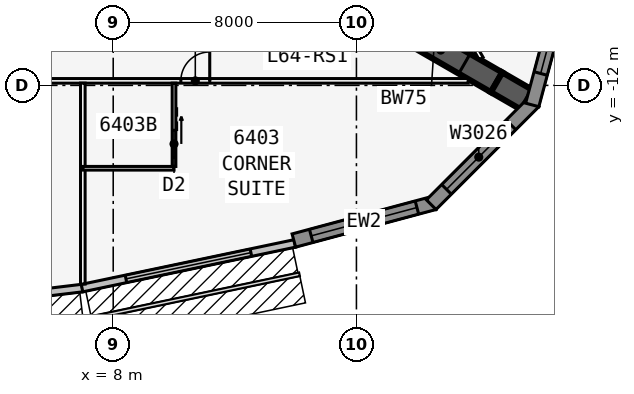
"""IFC4 building model, lengths in metres.
Left out: names, types, materials, properties, quantities, classifications, styles, units other than length and angle.
Written with IfcOpenShell. Run it as: python <this file> out.ifc"""

import sys

from ifc_helpers import new_model, si_unit, direction, frame, frame_2d, origin, place, context, subcontext, project, spatial, polyline, rectangle, outline, extrude, element, fill, save


model = new_model("IFC4")
c1 = context("Model", 3, precision=1e-05, world=origin(), true_north=direction((0.0, 1.0)))
c2 = subcontext(c1, "Body", "Model", "MODEL_VIEW")
j1 = project(units=[si_unit("LENGTHUNIT", "METRE"), si_unit("PLANEANGLEUNIT", "RADIAN")], contexts=[c1])
p1 = place(None, origin())
s1 = spatial("IfcSite", under=j1, at=p1, CompositionType="ELEMENT")
p2 = place(p1, origin())
s2 = spatial("IfcBuilding", under=s1, at=p2, CompositionType="ELEMENT")
p3 = place(p2, frame((0.0, 0.0, 242.9)))
s3 = spatial("IfcBuildingStorey", under=s2, at=p3, CompositionType="ELEMENT", Elevation=242.9)
p4 = place(p3, frame((16.5, -9.526, 0.0), z_axis=(0.0, 0.0, 1.0), x_axis=(0.866031398331, -0.499989616998, 0.0)))
e1 = element("IfcWall", 1, at=p4, inside=s3, PredefinedType="SHEAR", context=c2, shape_type="SweptSolid", body=[
    extrude(rectangle(XDim=4.746, YDim=0.75, at=frame_2d((2.373, 0.0))), origin(), (0.0, 0.0, 1.0), 3.6),
])
p5 = place(p4, frame((1.725, 0.0, 0.0)))
e2 = element("IfcOpeningElement", 2, at=p5, cuts=e1, PredefinedType="OPENING", context=c2, shape_type="SweptSolid", body=[
    extrude(rectangle(XDim=1.8, YDim=2.13, at=frame_2d((0.9, 1.065))), frame((0.0, 0.385, 0.0), z_axis=(0.0, -1.0, 0.0), x_axis=(1.0, 0.0, 0.0)), (0.0, 0.0, 1.0), 0.77),
])
p6 = place(p3, frame((20.61, -11.899, 0.0), z_axis=(0.0, 0.0, 1.0), x_axis=(0.866009537788, -0.500027479704, 0.0)))
e3 = element("IfcWall", 3, at=p6, inside=s3, PredefinedType="SHEAR", context=c2, shape_type="SweptSolid", body=[
    extrude(rectangle(XDim=1.155, YDim=0.75, at=frame_2d((0.577, 0.0))), origin(), (0.0, 0.0, 1.0), 3.6),
])
p7 = place(p3, frame((4.985, -18.906, 0.0), z_axis=(0.0, 0.0, 1.0), x_axis=(0.992877411981, 0.119140441403, 0.0)))
e4 = element("IfcWall", 4, at=p7, inside=s3, PredefinedType="STANDARD", context=c2, shape_type="SweptSolid", body=[
    extrude(rectangle(XDim=2.014, YDim=0.25, at=frame_2d((1.007, 0.0))), origin(), (0.0, 0.0, 1.0), 3.435),
])
p8 = place(p3, frame((6.974, -18.668, 0.0), z_axis=(0.0, 0.0, 1.0), x_axis=(0.978654320409, 0.205513311355, 0.0)))
e5 = element("IfcWall", 5, at=p8, inside=s3, PredefinedType="STANDARD", context=c2, shape_type="SweptSolid", body=[
    extrude(rectangle(XDim=7.153, YDim=0.25, at=frame_2d((3.576, 0.0))), origin(), (0.0, 0.0, 1.0), 3.435),
])
p9 = place(p8, frame((1.476, 0.0, 0.45)))
e6 = element("IfcOpeningElement", 6, at=p9, cuts=e5, PredefinedType="OPENING", context=c2, shape_type="SweptSolid", body=[
    extrude(rectangle(XDim=4.2, YDim=2.6, at=frame_2d((2.1, 1.3))), frame((0.0, 0.135, 0.0), z_axis=(0.0, -1.0, 0.0), x_axis=(1.0, 0.0, 0.0)), (0.0, 0.0, 1.0), 0.27),
])
p10 = place(p3, frame((13.942, -17.103, 0.0), z_axis=(0.0, 0.0, 1.0), x_axis=(0.965913862671, 0.258863689806, 0.0)))
e7 = element("IfcWall", 7, at=p10, inside=s3, PredefinedType="SOLIDWALL", context=c2, shape_type="SweptSolid", body=[
    extrude(rectangle(XDim=4.782, YDim=0.45, at=frame_2d((2.391, 0.0))), origin(), (0.0, 0.0, 1.0), 3.435),
])
p11 = place(p10, frame((0.591, 0.0, 0.45)))
e8 = element("IfcOpeningElement", 8, at=p11, cuts=e7, PredefinedType="OPENING", context=c2, shape_type="SweptSolid", body=[
    extrude(rectangle(XDim=3.6, YDim=2.6, at=frame_2d((1.8, 1.3))), frame((0.0, 0.235, 0.0), z_axis=(0.0, -1.0, 0.0), x_axis=(1.0, 0.0, 0.0)), (0.0, 0.0, 1.0), 0.47),
])
p12 = place(p3, frame((18.46, -15.924, 0.0), z_axis=(0.0, 0.0, 1.0), x_axis=(0.707081252484, 0.707132308968, 0.0)))
e9 = element("IfcWall", 9, at=p12, inside=s3, PredefinedType="SOLIDWALL", context=c2, shape_type="SweptSolid", body=[
    extrude(outline(polyline([(4.782, 0.225), (4.723, 0.225), (4.303, 0.113), (4.273, 0.225), (0.0, 0.225), (0.0, -0.225), (4.782, -0.225), (4.782, 0.225)])), origin(), (0.0, 0.0, 1.0), 3.435),
])
p13 = place(p12, frame((0.711, 0.0, 0.45)))
e10 = element("IfcOpeningElement", 10, at=p13, cuts=e9, PredefinedType="OPENING", context=c2, shape_type="SweptSolid", body=[
    extrude(rectangle(XDim=3.0, YDim=2.6, at=frame_2d((1.5, 1.3))), frame((0.0, 0.235, 0.0), z_axis=(0.0, -1.0, 0.0), x_axis=(1.0, 0.0, 0.0)), (0.0, 0.0, 1.0), 0.47),
])
p14 = place(p3, frame((21.783, -12.644, 0.0), z_axis=(0.0, 0.0, 1.0), x_axis=(0.25880328844, 0.965930048136, 0.0)))
e11 = element("IfcWall", 11, at=p14, inside=s3, PredefinedType="SOLIDWALL", context=c2, shape_type="SweptSolid", body=[
    extrude(outline(polyline([(4.782, 0.225), (0.509, 0.225), (0.479, 0.113), (0.06, 0.225), (0.0, 0.225), (0.0, -0.225), (4.782, -0.225), (4.782, 0.225)])), origin(), (0.0, 0.0, 1.0), 3.435),
])
p15 = place(p14, frame((1.07, 0.0, 0.45)))
e12 = element("IfcOpeningElement", 12, at=p15, cuts=e11, PredefinedType="OPENING", context=c2, shape_type="SweptSolid", body=[
    extrude(rectangle(XDim=3.0, YDim=2.6, at=frame_2d((1.5, 1.3))), frame((0.0, 0.235, 0.0), z_axis=(0.0, -1.0, 0.0), x_axis=(1.0, 0.0, 0.0)), (0.0, 0.0, 1.0), 0.47),
])
p16 = place(p3, frame((-19.677, -11.851, 0.0), z_axis=(0.0, 0.0, 1.0), x_axis=(1.0, 0.0, 0.0)))
e13 = element("IfcWall", 13, at=p16, inside=s3, PredefinedType="PARTITIONING", context=c2, shape_type="SweptSolid", body=[
    extrude(rectangle(XDim=39.354, YDim=0.15, at=frame_2d((19.677, 0.0))), origin(), (0.0, 0.0, 1.0), 3.435),
])
p17 = place(p16, frame((8.502, 0.0, 0.0)))
e14 = element("IfcOpeningElement", 14, at=p17, cuts=e13, PredefinedType="OPENING", context=c2, shape_type="SweptSolid", body=[
    extrude(rectangle(XDim=0.95, YDim=2.13, at=frame_2d((0.475, 1.065))), frame((0.0, 0.085, 0.0), z_axis=(0.0, -1.0, 0.0), x_axis=(1.0, 0.0, 0.0)), (0.0, 0.0, 1.0), 0.17),
])
p18 = place(p16, frame((15.677, 0.0, 0.0)))
e15 = element("IfcOpeningElement", 15, at=p18, cuts=e13, PredefinedType="OPENING", context=c2, shape_type="SweptSolid", body=[
    extrude(rectangle(XDim=1.0, YDim=2.13, at=frame_2d((0.5, 1.065))), frame((0.0, 0.085, 0.0), z_axis=(0.0, -1.0, 0.0), x_axis=(1.0, 0.0, 0.0)), (0.0, 0.0, 1.0), 0.17),
])
p19 = place(p16, frame((22.902, 0.0, 0.0)))
e16 = element("IfcOpeningElement", 16, at=p19, cuts=e13, PredefinedType="OPENING", context=c2, shape_type="SweptSolid", body=[
    extrude(rectangle(XDim=0.95, YDim=2.13, at=frame_2d((0.475, 1.065))), frame((0.0, 0.085, 0.0), z_axis=(0.0, -1.0, 0.0), x_axis=(1.0, 0.0, 0.0)), (0.0, 0.0, 1.0), 0.17),
])
p20 = place(p16, frame((29.902, 0.0, 0.0)))
e17 = element("IfcOpeningElement", 17, at=p20, cuts=e13, PredefinedType="OPENING", context=c2, shape_type="SweptSolid", body=[
    extrude(rectangle(XDim=0.95, YDim=2.13, at=frame_2d((0.475, 1.065))), frame((0.0, 0.085, 0.0), z_axis=(0.0, -1.0, 0.0), x_axis=(1.0, 0.0, 0.0)), (0.0, 0.0, 1.0), 0.17),
])
p21 = place(p3, frame((7.0, -11.926, 0.0), z_axis=(0.0, 0.0, 1.0), x_axis=(0.0, -1.0, 0.0)))
e18 = element("IfcWall", 18, at=p21, inside=s3, PredefinedType="PARTITIONING", context=c2, shape_type="SweptSolid", body=[
    extrude(rectangle(XDim=6.609, YDim=0.15, at=frame_2d((3.304, 0.0))), origin(), (0.0, 0.0, 1.0), 2.678),
])
p22 = place(p3, frame((7.0, -14.726, 0.0), z_axis=(0.0, 0.0, 1.0), x_axis=(1.0, 0.0, 0.0)))
e19 = element("IfcWall", 19, at=p22, inside=s3, PredefinedType="PLUMBINGWALL", context=c2, shape_type="SweptSolid", body=[
    extrude(rectangle(XDim=3.0, YDim=0.12, at=frame_2d((1.5, 0.0))), origin(), (0.0, 0.0, 1.0), 3.435),
])
p23 = place(p3, frame((10.0, -11.926, 0.0), z_axis=(0.0, 0.0, 1.0), x_axis=(0.0, -1.0, 0.0)))
e20 = element("IfcWall", 20, at=p23, inside=s3, PredefinedType="PLUMBINGWALL", context=c2, shape_type="SweptSolid", body=[
    extrude(rectangle(XDim=2.74, YDim=0.12, at=frame_2d((1.37, 0.0))), origin(), (0.0, 0.0, 1.0), 3.435),
])
p24 = place(p23, frame((1.55, 0.0, 0.0)))
e21 = element("IfcOpeningElement", 21, at=p24, cuts=e20, PredefinedType="OPENING", context=c2, shape_type="SweptSolid", body=[
    extrude(rectangle(XDim=0.9, YDim=2.13, at=frame_2d((0.45, 1.065))), frame((0.0, 0.07, 0.0), z_axis=(0.0, -1.0, 0.0), x_axis=(1.0, 0.0, 0.0)), (0.0, 0.0, 1.0), 0.14),
])
p25 = place(p3, frame((20.102, -11.115, 0.0), z_axis=(0.0, 0.0, 1.0), x_axis=(-0.500001960654, 0.866024271797, 0.0)))
e22 = element("IfcWall", 22, at=p25, inside=s3, PredefinedType="PARTITIONING", context=c2, shape_type="SweptSolid", body=[
    extrude(rectangle(XDim=12.677, YDim=0.15, at=frame_2d((6.339, 0.0))), origin(), (0.0, 0.0, 1.0), 3.435),
])
p26 = place(p25, frame((8.502, 0.0, 0.0)))
e23 = element("IfcOpeningElement", 23, at=p26, cuts=e22, PredefinedType="OPENING", context=c2, shape_type="SweptSolid", body=[
    extrude(rectangle(XDim=0.95, YDim=2.13, at=frame_2d((0.475, 1.065))), frame((0.0, 0.085, 0.0), z_axis=(0.0, -1.0, 0.0), x_axis=(1.0, 0.0, 0.0)), (0.0, 0.0, 1.0), 0.17),
])
p27 = place(p9, origin())
e24 = element("IfcWindow", 24, at=p27, inside=s3, PartitioningType="SINGLE_PANEL", PredefinedType="WINDOW", context=c2, shape_type="SweptSolid", body=[
    extrude(rectangle(XDim=4.2, YDim=2.6, at=frame_2d((2.1, 1.3))), frame((0.0, 0.03, 0.0), z_axis=(0.0, -1.0, 0.0), x_axis=(1.0, 0.0, 0.0)), (0.0, 0.0, 1.0), 0.06),
])
fill(e6, e24)
p28 = place(p11, origin())
e25 = element("IfcWindow", 25, at=p28, inside=s3, PartitioningType="SINGLE_PANEL", PredefinedType="WINDOW", context=c2, shape_type="SweptSolid", body=[
    extrude(rectangle(XDim=3.6, YDim=2.6, at=frame_2d((1.8, 1.3))), frame((0.0, 0.03, 0.0), z_axis=(0.0, -1.0, 0.0), x_axis=(1.0, 0.0, 0.0)), (0.0, 0.0, 1.0), 0.06),
])
fill(e8, e25)
p29 = place(p13, origin())
e26 = element("IfcWindow", 26, at=p29, inside=s3, PartitioningType="SINGLE_PANEL", PredefinedType="WINDOW", context=c2, shape_type="SweptSolid", body=[
    extrude(rectangle(XDim=3.0, YDim=2.6, at=frame_2d((1.5, 1.3))), frame((0.0, 0.03, 0.0), z_axis=(0.0, -1.0, 0.0), x_axis=(1.0, 0.0, 0.0)), (0.0, 0.0, 1.0), 0.06),
])
fill(e10, e26)
p30 = place(p15, origin())
e27 = element("IfcWindow", 27, at=p30, inside=s3, PartitioningType="SINGLE_PANEL", PredefinedType="WINDOW", context=c2, shape_type="SweptSolid", body=[
    extrude(rectangle(XDim=3.0, YDim=2.6, at=frame_2d((1.5, 1.3))), frame((0.0, 0.03, 0.0), z_axis=(0.0, -1.0, 0.0), x_axis=(1.0, 0.0, 0.0)), (0.0, 0.0, 1.0), 0.06),
])
fill(e12, e27)
p31 = place(p24, origin())
e28 = element("IfcDoor", 28, at=p31, inside=s3, OperationType="SLIDING_TO_LEFT", PredefinedType="DOOR", context=c2, shape_type="SweptSolid", body=[
    extrude(rectangle(XDim=0.9, YDim=2.13, at=frame_2d((0.45, 1.065))), frame((0.0, 0.025, 0.0), z_axis=(0.0, -1.0, 0.0), x_axis=(1.0, 0.0, 0.0)), (0.0, 0.0, 1.0), 0.05),
])
fill(e21, e28)
p32 = place(p20, origin())
e29 = element("IfcDoor", 29, at=p32, inside=s3, OperationType="SINGLE_SWING_RIGHT", PredefinedType="DOOR", context=c2, shape_type="SweptSolid", body=[
    extrude(rectangle(XDim=0.95, YDim=2.13, at=frame_2d((0.475, 1.065))), frame((0.0, 0.025, 0.0), z_axis=(0.0, -1.0, 0.0), x_axis=(1.0, 0.0, 0.0)), (0.0, 0.0, 1.0), 0.05),
])
fill(e17, e29)
p33 = place(p5, origin())
e30 = element("IfcDoor", 30, at=p33, inside=s3, OperationType="DOUBLE_DOOR_DOUBLE_SWING", PredefinedType="DOOR", context=c2, shape_type="SweptSolid", body=[
    extrude(rectangle(XDim=1.8, YDim=2.13, at=frame_2d((0.9, 1.065))), frame((0.0, 0.025, 0.0), z_axis=(0.0, -1.0, 0.0), x_axis=(1.0, 0.0, 0.0)), (0.0, 0.0, 1.0), 0.05),
])
fill(e2, e30)
save(model, sys.argv[1])
